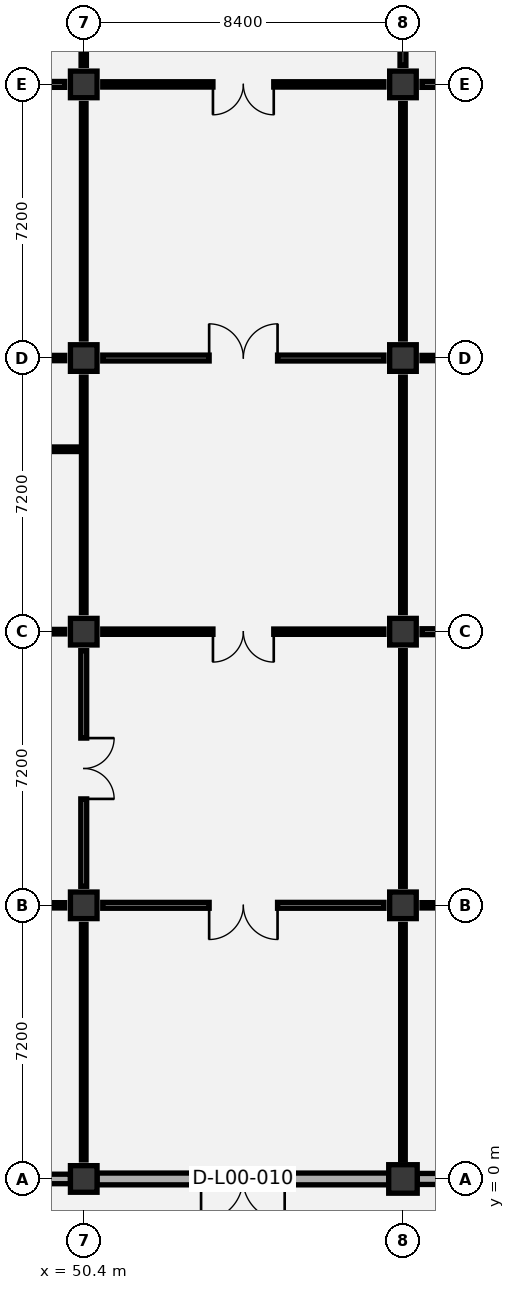
"""IFC4 building model, lengths in metres.
Left out: names, types, materials, properties, quantities, classifications, styles, units other than length and angle.
Written with IfcOpenShell. Run it as: python <this file> out.ifc"""

import sys

from ifc_helpers import new_model, si_unit, direction, frame, frame_2d, origin, origin_2d, place, context, subcontext, project, spatial, rectangle, circle, extrude, element, fill, save


model = new_model("IFC4")
c1 = context("Model", 3, precision=1e-05, world=origin(), true_north=direction((0.0, 1.0)))
c2 = subcontext(c1, "Body", "Model", "MODEL_VIEW")
j1 = project(units=[si_unit("LENGTHUNIT", "METRE"), si_unit("PLANEANGLEUNIT", "RADIAN")], contexts=[c1])
p1 = place(None, origin())
s1 = spatial("IfcSite", under=j1, at=p1, CompositionType="ELEMENT")
p2 = place(p1, origin())
s2 = spatial("IfcBuilding", under=s1, at=p2, CompositionType="ELEMENT")
p3 = place(p2, origin())
s3 = spatial("IfcBuildingStorey", under=s2, at=p3, CompositionType="ELEMENT", Elevation=0.0)
for number, where, z_axis, x_axis in (
    (1, (50.4, 0.0, 0.0), (0.0, 0.0, 1.0), (1.0, 0.0, 0.0)),
    (2, (50.4, 7.2, 0.0), (0.0, 0.0, 1.0), (1.0, 0.0, 0.0)),
    (3, (50.4, 14.4, 0.0), (0.0, 0.0, 1.0), (1.0, 0.0, 0.0)),
    (4, (50.4, 21.6, 0.0), (0.0, 0.0, 1.0), (1.0, 0.0, 0.0)),
    (5, (50.4, 28.8, 0.0), (0.0, 0.0, 1.0), (1.0, 0.0, 0.0)),
):
    element("IfcColumn", number, at=place(p3, frame(where, z_axis=z_axis, x_axis=x_axis)), inside=s3, PredefinedType="COLUMN", context=c2, shape_type="SweptSolid", body=[
        extrude(rectangle(XDim=0.7, YDim=0.7, at=origin_2d()), origin(), (0.0, 0.0, 1.0), 6.0),
    ])
p4 = place(p3, frame((58.8, 0.0, 0.0), z_axis=(0.0, 0.0, 1.0), x_axis=(1.0, 0.0, 0.0)))
e6 = element("IfcColumn", 6, at=p4, inside=s3, PredefinedType="COLUMN", context=c2, shape_type="SweptSolid", body=[
    extrude(circle(Radius=0.375, at=origin_2d()), origin(), (0.0, 0.0, 1.0), 6.0),
])
for number, where, z_axis, x_axis in (
    (7, (58.8, 7.2, 0.0), (0.0, 0.0, 1.0), (1.0, 0.0, 0.0)),
    (8, (58.8, 14.4, 0.0), (0.0, 0.0, 1.0), (1.0, 0.0, 0.0)),
    (9, (58.8, 21.6, 0.0), (0.0, 0.0, 1.0), (1.0, 0.0, 0.0)),
    (10, (58.8, 28.8, 0.0), (0.0, 0.0, 1.0), (1.0, 0.0, 0.0)),
):
    element("IfcColumn", number, at=place(p3, frame(where, z_axis=z_axis, x_axis=x_axis)), inside=s3, PredefinedType="COLUMN", context=c2, shape_type="SweptSolid", body=[
        extrude(rectangle(XDim=0.7, YDim=0.7, at=origin_2d()), origin(), (0.0, 0.0, 1.0), 6.0),
    ])
p5 = place(p3, frame((42.35, 0.0, 0.0), z_axis=(0.0, 0.0, 1.0), x_axis=(1.0, 0.0, 0.0)))
e11 = element("IfcWall", 11, at=p5, inside=s3, PredefinedType="SOLIDWALL", context=c2, shape_type="SweptSolid", body=[
    extrude(rectangle(XDim=7.7, YDim=0.25, at=frame_2d((3.85, 0.0))), origin(), (0.0, 0.0, 1.0), 5.02),
])
p6 = place(p5, frame((3.05, 0.0, 0.0)))
e12 = element("IfcOpeningElement", 12, at=p6, cuts=e11, PredefinedType="OPENING", context=c2, shape_type="SweptSolid", body=[
    extrude(rectangle(XDim=1.6, YDim=2.25, at=frame_2d((0.8, 1.125))), frame((0.0, 0.135, 0.0), z_axis=(0.0, -1.0, 0.0), x_axis=(1.0, 0.0, 0.0)), (0.0, 0.0, 1.0), 0.27),
])
p7 = place(p3, frame((50.75, 0.0, 0.0), z_axis=(0.0, 0.0, 1.0), x_axis=(1.0, 0.0, 0.0)))
e13 = element("IfcWall", 13, at=p7, inside=s3, PredefinedType="SOLIDWALL", context=c2, shape_type="SweptSolid", body=[
    extrude(rectangle(XDim=7.675, YDim=0.31, at=frame_2d((3.837, 0.0))), origin(), (0.0, 0.0, 1.0), 5.02),
])
p8 = place(p7, frame((2.738, 0.0, 0.0)))
e14 = element("IfcOpeningElement", 14, at=p8, cuts=e13, PredefinedType="OPENING", context=c2, shape_type="SweptSolid", body=[
    extrude(rectangle(XDim=2.2, YDim=2.45, at=frame_2d((1.1, 1.225))), frame((0.0, 0.165, 0.0), z_axis=(0.0, -1.0, 0.0), x_axis=(1.0, 0.0, 0.0)), (0.0, 0.0, 1.0), 0.33),
])
p9 = place(p3, frame((59.175, 0.0, 0.0), z_axis=(0.0, 0.0, 1.0), x_axis=(1.0, 0.0, 0.0)))
e15 = element("IfcWall", 15, at=p9, inside=s3, PredefinedType="SOLIDWALL", context=c2, shape_type="SweptSolid", body=[
    extrude(rectangle(XDim=7.675, YDim=0.29, at=frame_2d((3.837, 0.0))), origin(), (0.0, 0.0, 1.0), 5.02),
])
p10 = place(p9, frame((2.837, 0.0, 0.0)))
e16 = element("IfcOpeningElement", 16, at=p10, cuts=e15, PredefinedType="OPENING", context=c2, shape_type="SweptSolid", body=[
    extrude(rectangle(XDim=2.0, YDim=2.4, at=frame_2d((1.0, 1.2))), frame((0.0, 0.155, 0.0), z_axis=(0.0, -1.0, 0.0), x_axis=(1.0, 0.0, 0.0)), (0.0, 0.0, 1.0), 0.31),
])
p11 = place(p3, frame((42.15, 19.2, 0.0), z_axis=(0.0, 0.0, 1.0), x_axis=(1.0, 0.0, 0.0)))
e17 = element("IfcWall", 17, at=p11, inside=s3, PredefinedType="PARTITIONING", context=c2, shape_type="SweptSolid", body=[
    extrude(rectangle(XDim=8.1, YDim=0.12, at=frame_2d((4.05, 0.0))), origin(), (0.0, 0.0, 1.0), 5.675),
])
p12 = place(p11, frame((1.08, 0.0, 0.0)))
e18 = element("IfcOpeningElement", 18, at=p12, cuts=e17, PredefinedType="OPENING", context=c2, shape_type="SweptSolid", body=[
    extrude(rectangle(XDim=0.95, YDim=2.1, at=frame_2d((0.475, 1.05))), frame((0.0, 0.07, 0.0), z_axis=(0.0, -1.0, 0.0), x_axis=(1.0, 0.0, 0.0)), (0.0, 0.0, 1.0), 0.14),
])
p13 = place(p11, frame((3.63, 0.0, 0.0)))
e19 = element("IfcOpeningElement", 19, at=p13, cuts=e17, PredefinedType="OPENING", context=c2, shape_type="SweptSolid", body=[
    extrude(rectangle(XDim=0.9, YDim=2.1, at=frame_2d((0.45, 1.05))), frame((0.0, 0.07, 0.0), z_axis=(0.0, -1.0, 0.0), x_axis=(1.0, 0.0, 0.0)), (0.0, 0.0, 1.0), 0.14),
])
p14 = place(p11, frame((6.13, 0.0, 0.0)))
e20 = element("IfcOpeningElement", 20, at=p14, cuts=e17, PredefinedType="OPENING", context=c2, shape_type="SweptSolid", body=[
    extrude(rectangle(XDim=1.0, YDim=2.1, at=frame_2d((0.5, 1.05))), frame((0.0, 0.07, 0.0), z_axis=(0.0, -1.0, 0.0), x_axis=(1.0, 0.0, 0.0)), (0.0, 0.0, 1.0), 0.14),
])
p15 = place(p3, frame((50.4, 0.5, 0.0), z_axis=(0.0, 0.0, 1.0), x_axis=(0.0, 1.0, 0.0)))
e21 = element("IfcWall", 21, at=p15, inside=s3, PredefinedType="PARTITIONING", context=c2, shape_type="SweptSolid", body=[
    extrude(rectangle(XDim=6.2, YDim=0.12, at=frame_2d((3.1, 0.0))), origin(), (0.0, 0.0, 1.0), 5.27),
])
p16 = place(p3, frame((42.5, 7.2, 0.0), z_axis=(0.0, 0.0, 1.0), x_axis=(1.0, 0.0, 0.0)))
e22 = element("IfcWall", 22, at=p16, inside=s3, PredefinedType="PARTITIONING", context=c2, shape_type="SweptSolid", body=[
    extrude(rectangle(XDim=7.4, YDim=0.14, at=frame_2d((3.7, 0.0))), origin(), (0.0, 0.0, 1.0), 4.87),
])
p17 = place(p16, frame((2.8, 0.0, 0.0)))
e23 = element("IfcOpeningElement", 23, at=p17, cuts=e22, PredefinedType="OPENING", context=c2, shape_type="SweptSolid", body=[
    extrude(rectangle(XDim=1.8, YDim=2.25, at=frame_2d((0.9, 1.125))), frame((0.0, 0.08, 0.0), z_axis=(0.0, -1.0, 0.0), x_axis=(1.0, 0.0, 0.0)), (0.0, 0.0, 1.0), 0.16),
])
p18 = place(p3, frame((50.4, 7.7, 0.0), z_axis=(0.0, 0.0, 1.0), x_axis=(0.0, 1.0, 0.0)))
e24 = element("IfcWall", 24, at=p18, inside=s3, PredefinedType="PARTITIONING", context=c2, shape_type="SweptSolid", body=[
    extrude(rectangle(XDim=6.2, YDim=0.155, at=frame_2d((3.1, 0.0))), origin(), (0.0, 0.0, 1.0), 4.92),
])
p19 = place(p18, frame((2.3, 0.0, 0.0)))
e25 = element("IfcOpeningElement", 25, at=p19, cuts=e24, PredefinedType="OPENING", context=c2, shape_type="SweptSolid", body=[
    extrude(rectangle(XDim=1.6, YDim=2.2, at=frame_2d((0.8, 1.1))), frame((0.0, 0.087, 0.0), z_axis=(0.0, -1.0, 0.0), x_axis=(1.0, 0.0, 0.0)), (0.0, 0.0, 1.0), 0.175),
])
p20 = place(p3, frame((42.5, 14.4, 0.0), z_axis=(0.0, 0.0, 1.0), x_axis=(1.0, 0.0, 0.0)))
e26 = element("IfcWall", 26, at=p20, inside=s3, PredefinedType="PARTITIONING", context=c2, shape_type="SweptSolid", body=[
    extrude(rectangle(XDim=7.4, YDim=0.12, at=frame_2d((3.7, 0.0))), origin(), (0.0, 0.0, 1.0), 4.87),
])
p21 = place(p3, frame((50.4, 14.9, 0.0), z_axis=(0.0, 0.0, 1.0), x_axis=(0.0, 1.0, 0.0)))
e27 = element("IfcWall", 27, at=p21, inside=s3, PredefinedType="PARTITIONING", context=c2, shape_type="SweptSolid", body=[
    extrude(rectangle(XDim=6.2, YDim=0.12, at=frame_2d((3.1, 0.0))), origin(), (0.0, 0.0, 1.0), 5.38),
])
p22 = place(p3, frame((42.5, 21.6, 0.0), z_axis=(0.0, 0.0, 1.0), x_axis=(1.0, 0.0, 0.0)))
e28 = element("IfcWall", 28, at=p22, inside=s3, PredefinedType="PARTITIONING", context=c2, shape_type="SweptSolid", body=[
    extrude(rectangle(XDim=7.4, YDim=0.14, at=frame_2d((3.7, 0.0))), origin(), (0.0, 0.0, 1.0), 4.87),
])
p23 = place(p22, frame((2.8, 0.0, 0.0)))
e29 = element("IfcOpeningElement", 29, at=p23, cuts=e28, PredefinedType="OPENING", context=c2, shape_type="SweptSolid", body=[
    extrude(rectangle(XDim=1.8, YDim=2.25, at=frame_2d((0.9, 1.125))), frame((0.0, 0.08, 0.0), z_axis=(0.0, -1.0, 0.0), x_axis=(1.0, 0.0, 0.0)), (0.0, 0.0, 1.0), 0.16),
])
p24 = place(p3, frame((50.4, 22.1, 0.0), z_axis=(0.0, 0.0, 1.0), x_axis=(0.0, 1.0, 0.0)))
e30 = element("IfcWall", 30, at=p24, inside=s3, PredefinedType="PARTITIONING", context=c2, shape_type="SweptSolid", body=[
    extrude(rectangle(XDim=6.2, YDim=0.12, at=frame_2d((3.1, 0.0))), origin(), (0.0, 0.0, 1.0), 4.92),
])
p25 = place(p3, frame((42.5, 28.8, 0.0), z_axis=(0.0, 0.0, 1.0), x_axis=(1.0, 0.0, 0.0)))
e31 = element("IfcWall", 31, at=p25, inside=s3, PredefinedType="PARTITIONING", context=c2, shape_type="SweptSolid", body=[
    extrude(rectangle(XDim=7.4, YDim=0.155, at=frame_2d((3.7, 0.0))), origin(), (0.0, 0.0, 1.0), 4.87),
])
p26 = place(p25, frame((2.9, 0.0, 0.0)))
e32 = element("IfcOpeningElement", 32, at=p26, cuts=e31, PredefinedType="OPENING", context=c2, shape_type="SweptSolid", body=[
    extrude(rectangle(XDim=1.6, YDim=2.2, at=frame_2d((0.8, 1.1))), frame((0.0, 0.087, 0.0), z_axis=(0.0, -1.0, 0.0), x_axis=(1.0, 0.0, 0.0)), (0.0, 0.0, 1.0), 0.175),
])
p27 = place(p3, frame((50.4, 29.3, 0.0), z_axis=(0.0, 0.0, 1.0), x_axis=(0.0, 1.0, 0.0)))
e33 = element("IfcWall", 33, at=p27, inside=s3, PredefinedType="PARTITIONING", context=c2, shape_type="SweptSolid", body=[
    extrude(rectangle(XDim=6.2, YDim=0.14, at=frame_2d((3.1, 0.0))), origin(), (0.0, 0.0, 1.0), 5.17),
])
p28 = place(p27, frame((2.2, 0.0, 0.0)))
e34 = element("IfcOpeningElement", 34, at=p28, cuts=e33, PredefinedType="OPENING", context=c2, shape_type="SweptSolid", body=[
    extrude(rectangle(XDim=1.8, YDim=2.25, at=frame_2d((0.9, 1.125))), frame((0.0, 0.08, 0.0), z_axis=(0.0, -1.0, 0.0), x_axis=(1.0, 0.0, 0.0)), (0.0, 0.0, 1.0), 0.16),
])
p29 = place(p3, frame((58.8, 0.5, 0.0), z_axis=(0.0, 0.0, 1.0), x_axis=(0.0, 1.0, 0.0)))
e35 = element("IfcWall", 35, at=p29, inside=s3, PredefinedType="PARTITIONING", context=c2, shape_type="SweptSolid", body=[
    extrude(rectangle(XDim=6.2, YDim=0.12, at=frame_2d((3.1, 0.0))), origin(), (0.0, 0.0, 1.0), 4.92),
])
p30 = place(p3, frame((50.9, 7.2, 0.0), z_axis=(0.0, 0.0, 1.0), x_axis=(1.0, 0.0, 0.0)))
e36 = element("IfcWall", 36, at=p30, inside=s3, PredefinedType="PARTITIONING", context=c2, shape_type="SweptSolid", body=[
    extrude(rectangle(XDim=7.4, YDim=0.155, at=frame_2d((3.7, 0.0))), origin(), (0.0, 0.0, 1.0), 4.87),
])
p31 = place(p30, frame((2.8, 0.0, 0.0)))
e37 = element("IfcOpeningElement", 37, at=p31, cuts=e36, PredefinedType="OPENING", context=c2, shape_type="SweptSolid", body=[
    extrude(rectangle(XDim=1.8, YDim=2.25, at=frame_2d((0.9, 1.125))), frame((0.0, 0.087, 0.0), z_axis=(0.0, -1.0, 0.0), x_axis=(1.0, 0.0, 0.0)), (0.0, 0.0, 1.0), 0.175),
])
p32 = place(p3, frame((58.8, 7.7, 0.0), z_axis=(0.0, 0.0, 1.0), x_axis=(0.0, 1.0, 0.0)))
e38 = element("IfcWall", 38, at=p32, inside=s3, PredefinedType="PARTITIONING", context=c2, shape_type="SweptSolid", body=[
    extrude(rectangle(XDim=6.2, YDim=0.12, at=frame_2d((3.1, 0.0))), origin(), (0.0, 0.0, 1.0), 5.38),
])
p33 = place(p3, frame((50.9, 14.4, 0.0), z_axis=(0.0, 0.0, 1.0), x_axis=(1.0, 0.0, 0.0)))
e39 = element("IfcWall", 39, at=p33, inside=s3, PredefinedType="PARTITIONING", context=c2, shape_type="SweptSolid", body=[
    extrude(rectangle(XDim=7.4, YDim=0.14, at=frame_2d((3.7, 0.0))), origin(), (0.0, 0.0, 1.0), 4.87),
])
p34 = place(p33, frame((2.9, 0.0, 0.0)))
e40 = element("IfcOpeningElement", 40, at=p34, cuts=e39, PredefinedType="OPENING", context=c2, shape_type="SweptSolid", body=[
    extrude(rectangle(XDim=1.6, YDim=2.2, at=frame_2d((0.8, 1.1))), frame((0.0, 0.08, 0.0), z_axis=(0.0, -1.0, 0.0), x_axis=(1.0, 0.0, 0.0)), (0.0, 0.0, 1.0), 0.16),
])
p35 = place(p3, frame((58.8, 14.9, 0.0), z_axis=(0.0, 0.0, 1.0), x_axis=(0.0, 1.0, 0.0)))
e41 = element("IfcWall", 41, at=p35, inside=s3, PredefinedType="PARTITIONING", context=c2, shape_type="SweptSolid", body=[
    extrude(rectangle(XDim=6.2, YDim=0.12, at=frame_2d((3.1, 0.0))), origin(), (0.0, 0.0, 1.0), 4.92),
])
p36 = place(p3, frame((50.9, 21.6, 0.0), z_axis=(0.0, 0.0, 1.0), x_axis=(1.0, 0.0, 0.0)))
e42 = element("IfcWall", 42, at=p36, inside=s3, PredefinedType="PARTITIONING", context=c2, shape_type="SweptSolid", body=[
    extrude(rectangle(XDim=7.4, YDim=0.155, at=frame_2d((3.7, 0.0))), origin(), (0.0, 0.0, 1.0), 4.87),
])
p37 = place(p36, frame((2.8, 0.0, 0.0)))
e43 = element("IfcOpeningElement", 43, at=p37, cuts=e42, PredefinedType="OPENING", context=c2, shape_type="SweptSolid", body=[
    extrude(rectangle(XDim=1.8, YDim=2.25, at=frame_2d((0.9, 1.125))), frame((0.0, 0.087, 0.0), z_axis=(0.0, -1.0, 0.0), x_axis=(1.0, 0.0, 0.0)), (0.0, 0.0, 1.0), 0.175),
])
p38 = place(p3, frame((58.8, 22.1, 0.0), z_axis=(0.0, 0.0, 1.0), x_axis=(0.0, 1.0, 0.0)))
e44 = element("IfcWall", 44, at=p38, inside=s3, PredefinedType="PARTITIONING", context=c2, shape_type="SweptSolid", body=[
    extrude(rectangle(XDim=6.2, YDim=0.12, at=frame_2d((3.1, 0.0))), origin(), (0.0, 0.0, 1.0), 5.17),
])
p39 = place(p3, frame((50.9, 28.8, 0.0), z_axis=(0.0, 0.0, 1.0), x_axis=(1.0, 0.0, 0.0)))
e45 = element("IfcWall", 45, at=p39, inside=s3, PredefinedType="PARTITIONING", context=c2, shape_type="SweptSolid", body=[
    extrude(rectangle(XDim=7.4, YDim=0.14, at=frame_2d((3.7, 0.0))), origin(), (0.0, 0.0, 1.0), 4.87),
])
p40 = place(p39, frame((2.9, 0.0, 0.0)))
e46 = element("IfcOpeningElement", 46, at=p40, cuts=e45, PredefinedType="OPENING", context=c2, shape_type="SweptSolid", body=[
    extrude(rectangle(XDim=1.6, YDim=2.2, at=frame_2d((0.8, 1.1))), frame((0.0, 0.08, 0.0), z_axis=(0.0, -1.0, 0.0), x_axis=(1.0, 0.0, 0.0)), (0.0, 0.0, 1.0), 0.16),
])
p41 = place(p3, frame((58.8, 29.3, 0.0), z_axis=(0.0, 0.0, 1.0), x_axis=(0.0, 1.0, 0.0)))
e47 = element("IfcWall", 47, at=p41, inside=s3, PredefinedType="PARTITIONING", context=c2, shape_type="SweptSolid", body=[
    extrude(rectangle(XDim=6.2, YDim=0.155, at=frame_2d((3.1, 0.0))), origin(), (0.0, 0.0, 1.0), 4.92),
])
p42 = place(p41, frame((2.2, 0.0, 0.0)))
e48 = element("IfcOpeningElement", 48, at=p42, cuts=e47, PredefinedType="OPENING", context=c2, shape_type="SweptSolid", body=[
    extrude(rectangle(XDim=1.8, YDim=2.25, at=frame_2d((0.9, 1.125))), frame((0.0, 0.087, 0.0), z_axis=(0.0, -1.0, 0.0), x_axis=(1.0, 0.0, 0.0)), (0.0, 0.0, 1.0), 0.175),
])
p43 = place(p3, frame((59.3, 7.2, 0.0), z_axis=(0.0, 0.0, 1.0), x_axis=(1.0, 0.0, 0.0)))
e49 = element("IfcWall", 49, at=p43, inside=s3, PredefinedType="PARTITIONING", context=c2, shape_type="SweptSolid", body=[
    extrude(rectangle(XDim=7.4, YDim=0.14, at=frame_2d((3.7, 0.0))), origin(), (0.0, 0.0, 1.0), 4.87),
])
p44 = place(p43, frame((2.8, 0.0, 0.0)))
e50 = element("IfcOpeningElement", 50, at=p44, cuts=e49, PredefinedType="OPENING", context=c2, shape_type="SweptSolid", body=[
    extrude(rectangle(XDim=1.8, YDim=2.25, at=frame_2d((0.9, 1.125))), frame((0.0, 0.08, 0.0), z_axis=(0.0, -1.0, 0.0), x_axis=(1.0, 0.0, 0.0)), (0.0, 0.0, 1.0), 0.16),
])
p45 = place(p3, frame((59.3, 14.4, 0.0), z_axis=(0.0, 0.0, 1.0), x_axis=(1.0, 0.0, 0.0)))
e51 = element("IfcWall", 51, at=p45, inside=s3, PredefinedType="PARTITIONING", context=c2, shape_type="SweptSolid", body=[
    extrude(rectangle(XDim=7.4, YDim=0.155, at=frame_2d((3.7, 0.0))), origin(), (0.0, 0.0, 1.0), 4.87),
])
p46 = place(p45, frame((2.9, 0.0, 0.0)))
e52 = element("IfcOpeningElement", 52, at=p46, cuts=e51, PredefinedType="OPENING", context=c2, shape_type="SweptSolid", body=[
    extrude(rectangle(XDim=1.6, YDim=2.2, at=frame_2d((0.8, 1.1))), frame((0.0, 0.087, 0.0), z_axis=(0.0, -1.0, 0.0), x_axis=(1.0, 0.0, 0.0)), (0.0, 0.0, 1.0), 0.175),
])
p47 = place(p3, frame((59.3, 21.6, 0.0), z_axis=(0.0, 0.0, 1.0), x_axis=(1.0, 0.0, 0.0)))
e53 = element("IfcWall", 53, at=p47, inside=s3, PredefinedType="PARTITIONING", context=c2, shape_type="SweptSolid", body=[
    extrude(rectangle(XDim=7.4, YDim=0.14, at=frame_2d((3.7, 0.0))), origin(), (0.0, 0.0, 1.0), 4.87),
])
p48 = place(p47, frame((2.8, 0.0, 0.0)))
e54 = element("IfcOpeningElement", 54, at=p48, cuts=e53, PredefinedType="OPENING", context=c2, shape_type="SweptSolid", body=[
    extrude(rectangle(XDim=1.8, YDim=2.25, at=frame_2d((0.9, 1.125))), frame((0.0, 0.08, 0.0), z_axis=(0.0, -1.0, 0.0), x_axis=(1.0, 0.0, 0.0)), (0.0, 0.0, 1.0), 0.16),
])
p49 = place(p3, frame((59.3, 28.8, 0.0), z_axis=(0.0, 0.0, 1.0), x_axis=(1.0, 0.0, 0.0)))
e55 = element("IfcWall", 55, at=p49, inside=s3, PredefinedType="PARTITIONING", context=c2, shape_type="SweptSolid", body=[
    extrude(rectangle(XDim=7.4, YDim=0.155, at=frame_2d((3.7, 0.0))), origin(), (0.0, 0.0, 1.0), 4.87),
])
p50 = place(p49, frame((2.9, 0.0, 0.0)))
e56 = element("IfcOpeningElement", 56, at=p50, cuts=e55, PredefinedType="OPENING", context=c2, shape_type="SweptSolid", body=[
    extrude(rectangle(XDim=1.6, YDim=2.2, at=frame_2d((0.8, 1.1))), frame((0.0, 0.087, 0.0), z_axis=(0.0, -1.0, 0.0), x_axis=(1.0, 0.0, 0.0)), (0.0, 0.0, 1.0), 0.175),
])
p51 = place(p8, frame((2.2, 0.0, 0.0), z_axis=(0.0, 0.0, 1.0), x_axis=(-1.0, 0.0, 0.0)))
e57 = element("IfcDoor", 57, at=p51, inside=s3, OperationType="DOUBLE_DOOR_SINGLE_SWING", PredefinedType="DOOR", context=c2, shape_type="SweptSolid", body=[
    extrude(rectangle(XDim=2.2, YDim=2.45, at=frame_2d((1.1, 1.225))), frame((0.0, 0.025, 0.0), z_axis=(0.0, -1.0, 0.0), x_axis=(1.0, 0.0, 0.0)), (0.0, 0.0, 1.0), 0.05),
])
fill(e14, e57)
p52 = place(p19, frame((1.6, 0.0, 0.0), z_axis=(0.0, 0.0, 1.0), x_axis=(-1.0, 0.0, 0.0)))
e58 = element("IfcDoor", 58, at=p52, inside=s3, OperationType="DOUBLE_DOOR_SINGLE_SWING", PredefinedType="DOOR", context=c2, shape_type="SweptSolid", body=[
    extrude(rectangle(XDim=1.6, YDim=2.2, at=frame_2d((0.8, 1.1))), frame((0.0, 0.025, 0.0), z_axis=(0.0, -1.0, 0.0), x_axis=(1.0, 0.0, 0.0)), (0.0, 0.0, 1.0), 0.05),
])
fill(e25, e58)
p53 = place(p31, frame((1.8, 0.0, 0.0), z_axis=(0.0, 0.0, 1.0), x_axis=(-1.0, 0.0, 0.0)))
e59 = element("IfcDoor", 59, at=p53, inside=s3, OperationType="DOUBLE_DOOR_SINGLE_SWING", PredefinedType="DOOR", context=c2, shape_type="SweptSolid", body=[
    extrude(rectangle(XDim=1.8, YDim=2.25, at=frame_2d((0.9, 1.125))), frame((0.0, 0.025, 0.0), z_axis=(0.0, -1.0, 0.0), x_axis=(1.0, 0.0, 0.0)), (0.0, 0.0, 1.0), 0.05),
])
fill(e37, e59)
p54 = place(p34, frame((1.6, 0.0, 0.0), z_axis=(0.0, 0.0, 1.0), x_axis=(-1.0, 0.0, 0.0)))
e60 = element("IfcDoor", 60, at=p54, inside=s3, OperationType="DOUBLE_DOOR_SINGLE_SWING", PredefinedType="DOOR", context=c2, shape_type="SweptSolid", body=[
    extrude(rectangle(XDim=1.6, YDim=2.2, at=frame_2d((0.8, 1.1))), frame((0.0, 0.025, 0.0), z_axis=(0.0, -1.0, 0.0), x_axis=(1.0, 0.0, 0.0)), (0.0, 0.0, 1.0), 0.05),
])
fill(e40, e60)
p55 = place(p37, origin())
e61 = element("IfcDoor", 61, at=p55, inside=s3, OperationType="DOUBLE_DOOR_SINGLE_SWING", PredefinedType="DOOR", context=c2, shape_type="SweptSolid", body=[
    extrude(rectangle(XDim=1.8, YDim=2.25, at=frame_2d((0.9, 1.125))), frame((0.0, 0.025, 0.0), z_axis=(0.0, -1.0, 0.0), x_axis=(1.0, 0.0, 0.0)), (0.0, 0.0, 1.0), 0.05),
])
fill(e43, e61)
p56 = place(p40, frame((1.6, 0.0, 0.0), z_axis=(0.0, 0.0, 1.0), x_axis=(-1.0, 0.0, 0.0)))
e62 = element("IfcDoor", 62, at=p56, inside=s3, OperationType="DOUBLE_DOOR_SINGLE_SWING", PredefinedType="DOOR", context=c2, shape_type="SweptSolid", body=[
    extrude(rectangle(XDim=1.6, YDim=2.2, at=frame_2d((0.8, 1.1))), frame((0.0, 0.025, 0.0), z_axis=(0.0, -1.0, 0.0), x_axis=(1.0, 0.0, 0.0)), (0.0, 0.0, 1.0), 0.05),
])
fill(e46, e62)
save(model, sys.argv[1])
